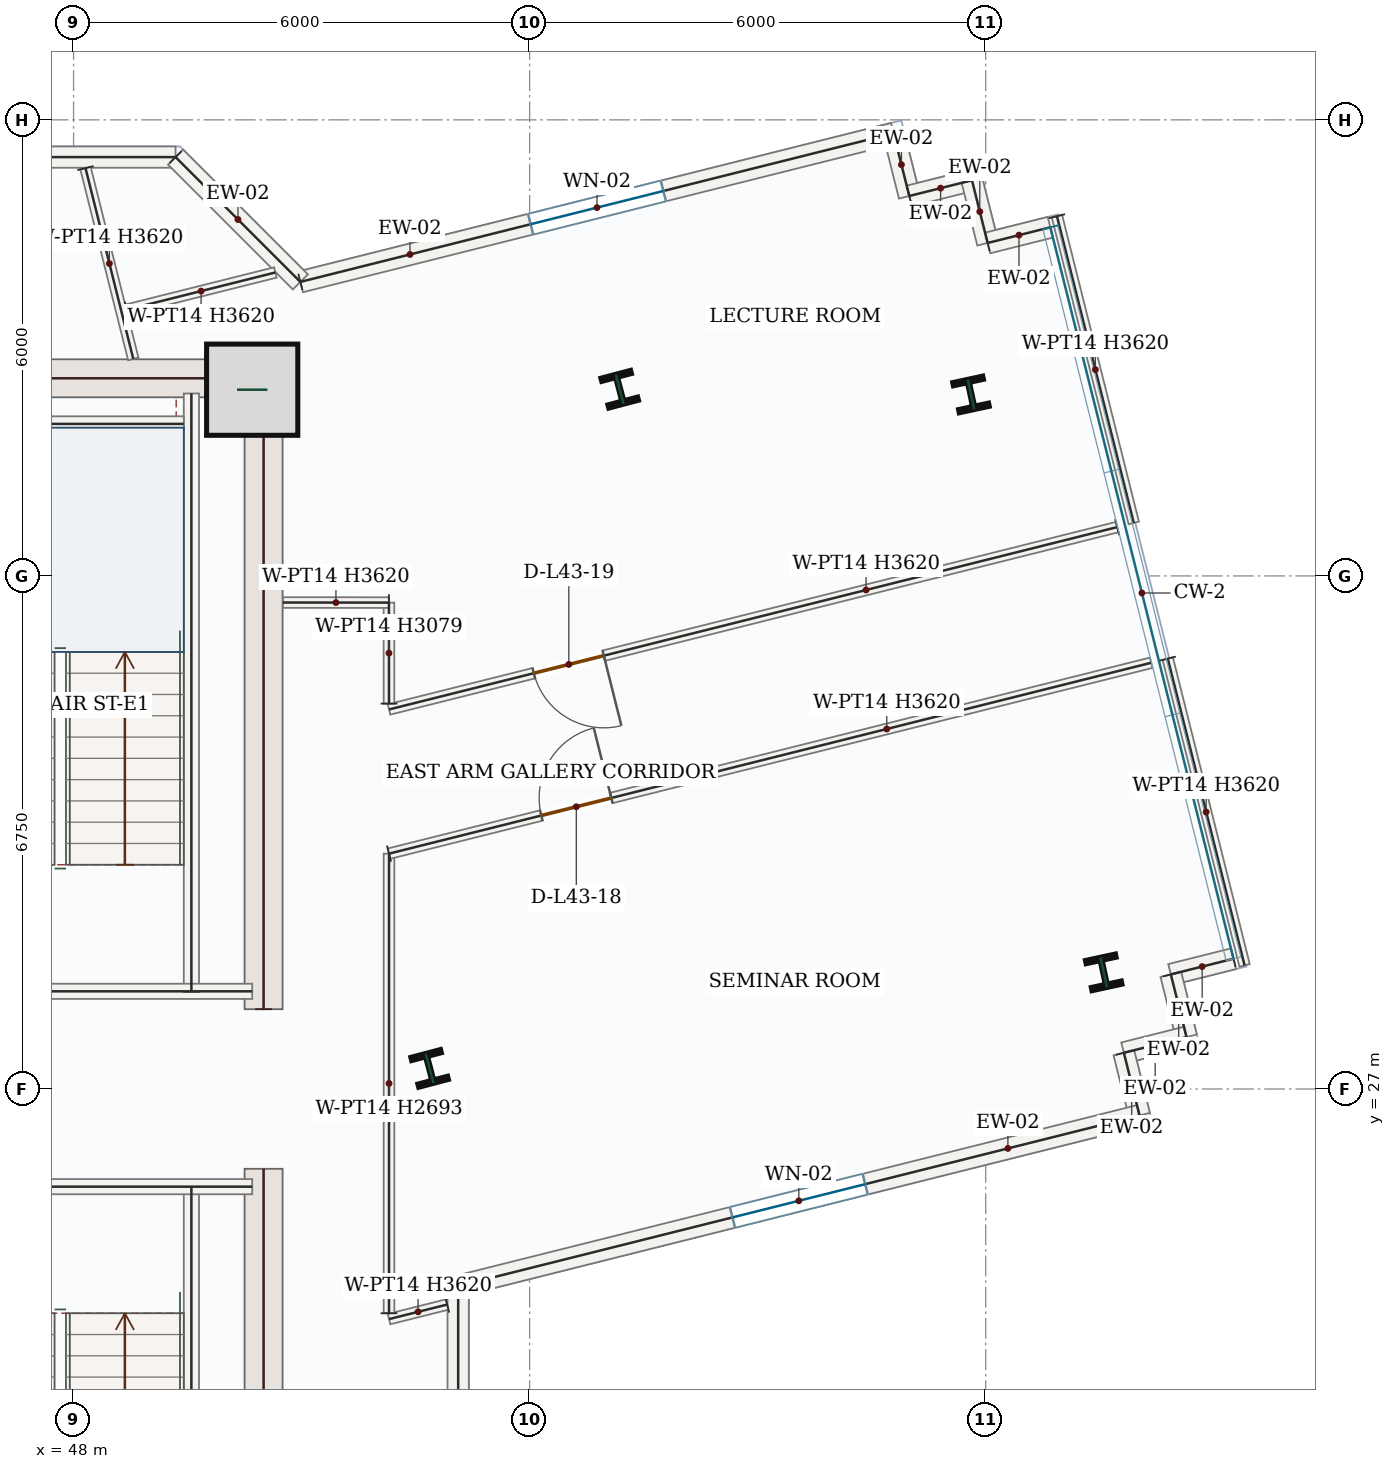
"""IFC4 building model, lengths in metres.
Left out: names, types, materials, properties, quantities, classifications, styles, units other than length and angle.
Written with IfcOpenShell. Run it as: python <this file> out.ifc"""

import sys

from ifc_helpers import new_model, si_unit, direction, frame, frame_2d, origin, origin_2d, place, context, subcontext, project, spatial, rectangle, i_section, extrude, source, transform, mapped, element, fill, save


model = new_model("IFC4")
c1 = context("Model", 3, precision=1e-05, world=origin(), true_north=direction((0.0, 1.0)))
c2 = subcontext(c1, "Body", "Model", "MODEL_VIEW")
j1 = project(units=[si_unit("LENGTHUNIT", "METRE"), si_unit("PLANEANGLEUNIT", "RADIAN")], contexts=[c1])
p1 = place(None, origin())
s1 = spatial("IfcSite", under=j1, at=p1, CompositionType="ELEMENT")
p2 = place(p1, origin())
s2 = spatial("IfcBuilding", under=s1, at=p2, CompositionType="ELEMENT")
p3 = place(p2, frame((0.0, 0.0, 186.3)))
s3 = spatial("IfcBuildingStorey", under=s2, at=p3, CompositionType="ELEMENT", Elevation=186.3)
m1 = source(origin(), c2, "Body", "SweptSolid", [
    extrude(rectangle(XDim=8.55, YDim=0.5, at=frame_2d((4.275, 0.0))), origin(), (0.0, 0.0, 1.0), 3.62),
])
for number, where, z_axis, x_axis in (
    (1, (50.5, 17.4, 0.0), (0.0, 0.0, 1.0), (0.0, 1.0, 0.0)),
    (2, (50.5, 28.05, 0.0), (0.0, 0.0, 1.0), (0.0, 1.0, 0.0)),
):
    element("IfcWall", number, at=place(p3, frame(where, z_axis=z_axis, x_axis=x_axis)), inside=s3, PredefinedType="SHEAR", context=c2, shape_type="MappedRepresentation", body=[
        mapped(m1, transform((0.0, 0.0, 0.0), x_axis=(1.0, 0.0, 0.0), y_axis=(0.0, 1.0, 0.0), z_axis=(0.0, 0.0, 1.0), scale=1.0)),
    ])
m2 = source(origin(), c2, "Body", "SweptSolid", [
    extrude(rectangle(XDim=7.0, YDim=0.5, at=frame_2d((3.5, 0.0))), origin(), (0.0, 0.0, 1.0), 3.62),
])
p4 = place(p3, frame((43.25, 36.35, 0.0), z_axis=(0.0, 0.0, 1.0), x_axis=(1.0, 0.0, 0.0)))
e3 = element("IfcWall", 3, at=p4, inside=s3, PredefinedType="SHEAR", context=c2, shape_type="MappedRepresentation", body=[
    mapped(m2, transform((0.0, 0.0, 0.0), x_axis=(1.0, 0.0, 0.0), y_axis=(0.0, 1.0, 0.0), z_axis=(0.0, 0.0, 1.0), scale=1.0)),
])
m3 = source(origin(), c2, "Body", "SweptSolid", [
    extrude(rectangle(XDim=1.2, YDim=1.2, at=origin_2d()), origin(), (0.0, 0.0, 1.0), 3.9),
])
p5 = place(p3, frame((50.35, 36.2, 0.0), z_axis=(0.0, 0.0, 1.0), x_axis=(1.0, 0.0, 0.0)))
e4 = element("IfcColumn", 4, at=p5, inside=s3, PredefinedType="COLUMN", context=c2, shape_type="MappedRepresentation", body=[
    mapped(m3, transform((0.0, 0.0, 0.0), x_axis=(1.0, 0.0, 0.0), y_axis=(0.0, 1.0, 0.0), z_axis=(0.0, 0.0, 1.0), scale=1.0)),
])
m4 = source(origin(), c2, "Body", "SweptSolid", [
    extrude(i_section(OverallWidth=0.404, OverallDepth=0.407, WebThickness=0.027, FlangeThickness=0.044, FilletRadius=0.018, at=origin_2d()), origin(), (0.0, 0.0, 1.0), 3.9),
])
for number, where, z_axis, x_axis in (
    (5, (52.684, 27.271, 0.0), (0.0, 0.0, 1.0), (0.967, 0.255, 0.0)),
    (6, (55.185, 36.206, 0.0), (0.0, 0.0, 1.0), (0.967, 0.255, 0.0)),
    (7, (61.553, 28.535, 0.0), (0.0, 0.0, 1.0), (0.977, 0.211, 0.0)),
    (8, (59.807, 36.137, 0.0), (0.0, 0.0, 1.0), (0.977, 0.211, 0.0)),
):
    element("IfcColumn", number, at=place(p3, frame(where, z_axis=z_axis, x_axis=x_axis)), inside=s3, PredefinedType="COLUMN", context=c2, shape_type="MappedRepresentation", body=[
        mapped(m4, transform((0.0, 0.0, 0.0), x_axis=(1.0, 0.0, 0.0), y_axis=(0.0, 1.0, 0.0), z_axis=(0.0, 0.0, 1.0), scale=1.0)),
    ])
p6 = place(p3, frame((50.984, 37.618, 0.0), z_axis=(0.0, 0.0, 1.0), x_axis=(0.970040669564, 0.242942584557, 0.0)))
e9 = element("IfcWall", 9, at=p6, inside=s3, PredefinedType="SOLIDWALL", context=c2, shape_type="SweptSolid", body=[
    extrude(rectangle(XDim=8.045, YDim=0.28, at=frame_2d((4.023, 0.0))), origin(), (0.0, 0.0, 1.0), 3.62),
])
p7 = place(p6, frame((3.123, 0.0, 0.85)))
e10 = element("IfcOpeningElement", 10, at=p7, cuts=e9, PredefinedType="OPENING", context=c2, shape_type="SweptSolid", body=[
    extrude(rectangle(XDim=1.8, YDim=1.75, at=frame_2d((0.9, 0.875))), frame((0.0, 0.15, 0.0), z_axis=(0.0, -1.0, 0.0), x_axis=(1.0, 0.0, 0.0)), (0.0, 0.0, 1.0), 0.3),
])
m5 = source(origin(), c2, "Body", "SweptSolid", [
    extrude(rectangle(XDim=0.85, YDim=0.28, at=frame_2d((0.425, 0.0))), origin(), (0.0, 0.0, 1.0), 3.62),
])
for number, where, z_axis, x_axis in (
    (11, (58.788, 39.573, 0.0), (0.0, 0.0, 1.0), (0.243, -0.97, 0.0)),
    (12, (58.995, 38.748, 0.0), (0.0, 0.0, 1.0), (0.97, 0.243, 0.0)),
):
    element("IfcWall", number, at=place(p3, frame(where, z_axis=z_axis, x_axis=x_axis)), inside=s3, PredefinedType="SOLIDWALL", context=c2, shape_type="MappedRepresentation", body=[
        mapped(m5, transform((0.0, 0.0, 0.0), x_axis=(1.0, 0.0, 0.0), y_axis=(0.0, 1.0, 0.0), z_axis=(0.0, 0.0, 1.0), scale=1.0)),
    ])
m6 = source(origin(), c2, "Body", "SweptSolid", [
    extrude(rectangle(XDim=0.85, YDim=0.28, at=frame_2d((0.425, 0.0))), origin(), (0.0, 0.0, 1.0), 3.62),
])
p8 = place(p3, frame((59.819, 38.955, 0.0), z_axis=(0.0, 0.0, 1.0), x_axis=(0.242941012307, -0.970041063326, 0.0)))
e13 = element("IfcWall", 13, at=p8, inside=s3, PredefinedType="SOLIDWALL", context=c2, shape_type="MappedRepresentation", body=[
    mapped(m6, transform((0.0, 0.0, 0.0), x_axis=(1.0, 0.0, 0.0), y_axis=(0.0, 1.0, 0.0), z_axis=(0.0, 0.0, 1.0), scale=1.0)),
])
for number, where, z_axis, x_axis in (
    (14, (60.026, 38.13, 0.0), (0.0, 0.0, 1.0), (0.97, 0.243, 0.0)),
    (15, (63.26, 28.714, 0.0), (0.0, 0.0, 1.0), (-0.97, -0.243, 0.0)),
    (16, (62.436, 28.507, 0.0), (0.0, 0.0, 1.0), (0.243, -0.97, 0.0)),
):
    element("IfcWall", number, at=place(p3, frame(where, z_axis=z_axis, x_axis=x_axis)), inside=s3, PredefinedType="SOLIDWALL", context=c2, shape_type="MappedRepresentation", body=[
        mapped(m5, transform((0.0, 0.0, 0.0), x_axis=(1.0, 0.0, 0.0), y_axis=(0.0, 1.0, 0.0), z_axis=(0.0, 0.0, 1.0), scale=1.0)),
    ])
p9 = place(p3, frame((62.642, 27.683, 0.0), z_axis=(0.0, 0.0, 1.0), x_axis=(-0.970041063326, -0.242941012307, 0.0)))
e17 = element("IfcWall", 17, at=p9, inside=s3, PredefinedType="SOLIDWALL", context=c2, shape_type="MappedRepresentation", body=[
    mapped(m6, transform((0.0, 0.0, 0.0), x_axis=(1.0, 0.0, 0.0), y_axis=(0.0, 1.0, 0.0), z_axis=(0.0, 0.0, 1.0), scale=1.0)),
])
p10 = place(p3, frame((61.818, 27.476, 0.0), z_axis=(0.0, 0.0, 1.0), x_axis=(0.243008704507, -0.970024107708, 0.0)))
e18 = element("IfcWall", 18, at=p10, inside=s3, PredefinedType="SOLIDWALL", context=c2, shape_type="MappedRepresentation", body=[
    mapped(m5, transform((0.0, 0.0, 0.0), x_axis=(1.0, 0.0, 0.0), y_axis=(0.0, 1.0, 0.0), z_axis=(0.0, 0.0, 1.0), scale=1.0)),
])
p11 = place(p3, frame((62.024, 26.652, 0.0), z_axis=(0.0, 0.0, 1.0), x_axis=(-0.970044513566, -0.242927235402, 0.0)))
e19 = element("IfcWall", 19, at=p11, inside=s3, PredefinedType="SOLIDWALL", context=c2, shape_type="SweptSolid", body=[
    extrude(rectangle(XDim=9.241, YDim=0.28, at=frame_2d((4.621, 0.0))), origin(), (0.0, 0.0, 1.0), 3.62),
])
p12 = place(p11, frame((3.721, 0.0, 0.85)))
e20 = element("IfcOpeningElement", 20, at=p12, cuts=e19, PredefinedType="OPENING", context=c2, shape_type="SweptSolid", body=[
    extrude(rectangle(XDim=1.8, YDim=1.75, at=frame_2d((0.9, 0.875))), frame((0.0, 0.15, 0.0), z_axis=(0.0, -1.0, 0.0), x_axis=(1.0, 0.0, 0.0)), (0.0, 0.0, 1.0), 0.3),
])
m7 = source(origin(), c2, "Body", "SweptSolid", [
    extrude(rectangle(XDim=5.949, YDim=0.28, at=frame_2d((2.975, 0.0))), origin(), (0.0, 0.0, 1.0), 3.62),
])
p13 = place(p3, frame((53.06, 24.407, 0.0), z_axis=(0.0, 0.0, 1.0), x_axis=(0.0, -1.0, 0.0)))
e21 = element("IfcWall", 21, at=p13, inside=s3, PredefinedType="SOLIDWALL", context=c2, shape_type="MappedRepresentation", body=[
    mapped(m7, transform((0.0, 0.0, 0.0), x_axis=(1.0, 0.0, 0.0), y_axis=(0.0, 1.0, 0.0), z_axis=(0.0, 0.0, 1.0), scale=1.0)),
])
m8 = source(origin(), c2, "Body", "SweptSolid", [
    extrude(rectangle(XDim=9.547, YDim=0.28, at=frame_2d((4.773, 0.0))), origin(), (0.0, 0.0, 1.0), 3.62),
])
p14 = place(p3, frame((39.795, 39.26, 0.0), z_axis=(0.0, 0.0, 1.0), x_axis=(1.0, 0.0, 0.0)))
e22 = element("IfcWall", 22, at=p14, inside=s3, PredefinedType="SOLIDWALL", context=c2, shape_type="MappedRepresentation", body=[
    mapped(m8, transform((0.0, 0.0, 0.0), x_axis=(1.0, 0.0, 0.0), y_axis=(0.0, 1.0, 0.0), z_axis=(0.0, 0.0, 1.0), scale=1.0)),
])
m9 = source(origin(), c2, "Body", "SweptSolid", [
    extrude(rectangle(XDim=2.322, YDim=0.28, at=frame_2d((1.161, 0.0))), origin(), (0.0, 0.0, 1.0), 3.62),
])
p15 = place(p3, frame((49.342, 39.26, 0.0), z_axis=(0.0, 0.0, 1.0), x_axis=(0.707106781187, -0.707106781187, 0.0)))
e23 = element("IfcWall", 23, at=p15, inside=s3, PredefinedType="SOLIDWALL", context=c2, shape_type="MappedRepresentation", body=[
    mapped(m9, transform((0.0, 0.0, 0.0), x_axis=(1.0, 0.0, 0.0), y_axis=(0.0, 1.0, 0.0), z_axis=(0.0, 0.0, 1.0), scale=1.0)),
])
m10 = source(origin(), c2, "Body", "SweptSolid", [
    extrude(rectangle(XDim=7.87, YDim=0.2, at=frame_2d((3.935, 0.0))), origin(), (0.0, 0.0, 1.0), 3.62),
])
for number, where, z_axis, x_axis in (
    (24, (49.55, 17.85, 0.0), (0.0, 0.0, 1.0), (0.0, 1.0, 0.0)),
    (25, (49.55, 28.28, 0.0), (0.0, 0.0, 1.0), (0.0, 1.0, 0.0)),
):
    element("IfcWall", number, at=place(p3, frame(where, z_axis=z_axis, x_axis=x_axis)), inside=s3, PredefinedType="SOLIDWALL", context=c2, shape_type="MappedRepresentation", body=[
        mapped(m10, transform((0.0, 0.0, 0.0), x_axis=(1.0, 0.0, 0.0), y_axis=(0.0, 1.0, 0.0), z_axis=(0.0, 0.0, 1.0), scale=1.0)),
    ])
m11 = source(origin(), c2, "Body", "SweptSolid", [
    extrude(rectangle(XDim=4.25, YDim=0.2, at=frame_2d((2.125, 0.0))), origin(), (0.0, 0.0, 1.0), 3.62),
])
for number, where, z_axis, x_axis in (
    (26, (46.1, 25.715, 0.0), (0.0, 0.0, 1.0), (1.0, 0.0, 0.0)),
    (27, (46.1, 28.285, 0.0), (0.0, 0.0, 1.0), (1.0, 0.0, 0.0)),
):
    element("IfcWall", number, at=place(p3, frame(where, z_axis=z_axis, x_axis=x_axis)), inside=s3, PredefinedType="SOLIDWALL", context=c2, shape_type="MappedRepresentation", body=[
        mapped(m11, transform((0.0, 0.0, 0.0), x_axis=(1.0, 0.0, 0.0), y_axis=(0.0, 1.0, 0.0), z_axis=(0.0, 0.0, 1.0), scale=1.0)),
    ])
m12 = source(origin(), c2, "Body", "SweptSolid", [
    extrude(rectangle(XDim=3.25, YDim=0.2, at=frame_2d((1.625, 0.0))), origin(), (0.0, 0.0, 1.0), 3.62),
])
p16 = place(p3, frame((46.2, 35.75, 0.0), z_axis=(0.0, 0.0, 1.0), x_axis=(1.0, 0.0, 0.0)))
e28 = element("IfcWall", 28, at=p16, inside=s3, PredefinedType="SOLIDWALL", context=c2, shape_type="MappedRepresentation", body=[
    mapped(m12, transform((0.0, 0.0, 0.0), x_axis=(1.0, 0.0, 0.0), y_axis=(0.0, 1.0, 0.0), z_axis=(0.0, 0.0, 1.0), scale=1.0)),
])
m13 = source(origin(), c2, "Body", "SweptSolid", [
    extrude(rectangle(XDim=2.588, YDim=0.14, at=frame_2d((1.294, 0.0))), origin(), (0.0, 0.0, 1.0), 3.62),
])
p17 = place(p3, frame((48.157, 39.115, 0.0), z_axis=(0.0, 0.0, 1.0), x_axis=(0.242957412811, -0.97003695577, 0.0)))
e29 = element("IfcWall", 29, at=p17, inside=s3, PredefinedType="PARTITIONING", context=c2, shape_type="MappedRepresentation", body=[
    mapped(m13, transform((0.0, 0.0, 0.0), x_axis=(1.0, 0.0, 0.0), y_axis=(0.0, 1.0, 0.0), z_axis=(0.0, 0.0, 1.0), scale=1.0)),
])
m14 = source(origin(), c2, "Body", "SweptSolid", [
    extrude(rectangle(XDim=2.014, YDim=0.14, at=frame_2d((1.007, 0.0))), origin(), (0.0, 0.0, 1.0), 3.62),
])
p18 = place(p3, frame((48.701, 37.253, 0.0), z_axis=(0.0, 0.0, 1.0), x_axis=(0.970056889313, 0.242877811867, 0.0)))
e30 = element("IfcWall", 30, at=p18, inside=s3, PredefinedType="PARTITIONING", context=c2, shape_type="MappedRepresentation", body=[
    mapped(m14, transform((0.0, 0.0, 0.0), x_axis=(1.0, 0.0, 0.0), y_axis=(0.0, 1.0, 0.0), z_axis=(0.0, 0.0, 1.0), scale=1.0)),
])
m15 = source(origin(), c2, "Body", "SweptSolid", [
    extrude(rectangle(XDim=4.16, YDim=0.14, at=frame_2d((2.08, 0.0))), origin(), (0.0, 0.0, 1.0), 3.62),
])
p19 = place(p3, frame((60.938, 38.482, 0.0), z_axis=(0.0, 0.0, 1.0), x_axis=(0.242963670411, -0.970035388458, 0.0)))
e31 = element("IfcWall", 31, at=p19, inside=s3, PredefinedType="PARTITIONING", context=c2, shape_type="MappedRepresentation", body=[
    mapped(m15, transform((0.0, 0.0, 0.0), x_axis=(1.0, 0.0, 0.0), y_axis=(0.0, 1.0, 0.0), z_axis=(0.0, 0.0, 1.0), scale=1.0)),
])
p20 = place(p3, frame((61.73, 34.392, 0.0), z_axis=(0.0, 0.0, 1.0), x_axis=(-0.970043536382, -0.242931137411, 0.0)))
e32 = element("IfcWall", 32, at=p20, inside=s3, PredefinedType="PARTITIONING", context=c2, shape_type="SweptSolid", body=[
    extrude(rectangle(XDim=9.876, YDim=0.14, at=frame_2d((4.938, 0.0))), origin(), (0.0, 0.0, 1.0), 3.62),
])
p21 = place(p20, frame((6.962, 0.0, 0.0)))
e33 = element("IfcOpeningElement", 33, at=p21, cuts=e32, PredefinedType="OPENING", context=c2, shape_type="SweptSolid", body=[
    extrude(rectangle(XDim=0.95, YDim=2.15, at=frame_2d((0.475, 1.075))), frame((0.0, 0.08, 0.0), z_axis=(0.0, -1.0, 0.0), x_axis=(1.0, 0.0, 0.0)), (0.0, 0.0, 1.0), 0.16),
])
m16 = source(origin(), c2, "Body", "SweptSolid", [
    extrude(rectangle(XDim=1.329, YDim=0.14, at=frame_2d((0.664, 0.0))), origin(), (0.0, 0.0, 1.0), 3.079),
])
p22 = place(p3, frame((52.15, 32.07, 0.0), z_axis=(0.0, 0.0, 1.0), x_axis=(-0.00073502369, 0.99999972987, 0.0)))
e34 = element("IfcWall", 34, at=p22, inside=s3, PredefinedType="PARTITIONING", context=c2, shape_type="MappedRepresentation", body=[
    mapped(m16, transform((0.0, 0.0, 0.0), x_axis=(1.0, 0.0, 0.0), y_axis=(0.0, 1.0, 0.0), z_axis=(0.0, 0.0, 1.0), scale=1.0)),
])
m17 = source(origin(), c2, "Body", "SweptSolid", [
    extrude(rectangle(XDim=1.394, YDim=0.14, at=frame_2d((0.697, 0.0))), origin(), (0.0, 0.0, 1.0), 3.62),
])
p23 = place(p3, frame((52.149, 33.399, 0.0), z_axis=(0.0, 0.0, 1.0), x_axis=(-0.999999754632, 0.000700525222, 0.0)))
e35 = element("IfcWall", 35, at=p23, inside=s3, PredefinedType="PARTITIONING", context=c2, shape_type="MappedRepresentation", body=[
    mapped(m17, transform((0.0, 0.0, 0.0), x_axis=(1.0, 0.0, 0.0), y_axis=(0.0, 1.0, 0.0), z_axis=(0.0, 0.0, 1.0), scale=1.0)),
])
p24 = place(p3, frame((62.395, 32.662, 0.0), z_axis=(0.0, 0.0, 1.0), x_axis=(0.242963670411, -0.970035388458, 0.0)))
e36 = element("IfcWall", 36, at=p24, inside=s3, PredefinedType="PARTITIONING", context=c2, shape_type="MappedRepresentation", body=[
    mapped(m15, transform((0.0, 0.0, 0.0), x_axis=(1.0, 0.0, 0.0), y_axis=(0.0, 1.0, 0.0), z_axis=(0.0, 0.0, 1.0), scale=1.0)),
])
m18 = source(origin(), c2, "Body", "SweptSolid", [
    extrude(rectangle(XDim=0.789, YDim=0.14, at=frame_2d((0.395, 0.0))), origin(), (0.0, 0.0, 1.0), 3.62),
])
p25 = place(p3, frame((52.915, 24.164, 0.0), z_axis=(0.0, 0.0, 1.0), x_axis=(-0.970033159667, -0.242972568711, 0.0)))
e37 = element("IfcWall", 37, at=p25, inside=s3, PredefinedType="PARTITIONING", context=c2, shape_type="MappedRepresentation", body=[
    mapped(m18, transform((0.0, 0.0, 0.0), x_axis=(1.0, 0.0, 0.0), y_axis=(0.0, 1.0, 0.0), z_axis=(0.0, 0.0, 1.0), scale=1.0)),
])
m19 = source(origin(), c2, "Body", "SweptSolid", [
    extrude(rectangle(XDim=6.046, YDim=0.14, at=frame_2d((3.023, 0.0))), origin(), (0.0, 0.0, 1.0), 2.693),
])
p26 = place(p3, frame((52.15, 24.05, 0.0), z_axis=(0.0, 0.0, 1.0), x_axis=(0.0, 1.0, 0.0)))
e38 = element("IfcWall", 38, at=p26, inside=s3, PredefinedType="PARTITIONING", context=c2, shape_type="MappedRepresentation", body=[
    mapped(m19, transform((0.0, 0.0, 0.0), x_axis=(1.0, 0.0, 0.0), y_axis=(0.0, 1.0, 0.0), z_axis=(0.0, 0.0, 1.0), scale=1.0)),
])
p27 = place(p3, frame((52.15, 30.096, 0.0), z_axis=(0.0, 0.0, 1.0), x_axis=(0.970040994122, 0.242941288635, 0.0)))
e39 = element("IfcWall", 39, at=p27, inside=s3, PredefinedType="PARTITIONING", context=c2, shape_type="SweptSolid", body=[
    extrude(rectangle(XDim=10.337, YDim=0.14, at=frame_2d((5.168, 0.0))), origin(), (0.0, 0.0, 1.0), 3.62),
])
p28 = place(p27, frame((2.065, 0.0, 0.0)))
e40 = element("IfcOpeningElement", 40, at=p28, cuts=e39, PredefinedType="OPENING", context=c2, shape_type="SweptSolid", body=[
    extrude(rectangle(XDim=0.95, YDim=2.15, at=frame_2d((0.475, 1.075))), frame((0.0, 0.08, 0.0), z_axis=(0.0, -1.0, 0.0), x_axis=(1.0, 0.0, 0.0)), (0.0, 0.0, 1.0), 0.16),
])
m20 = source(origin(), c2, "Body", "SweptSolid", [
    extrude(rectangle(XDim=1.8, YDim=1.75, at=frame_2d((0.9, 0.875))), frame((0.0, 0.03, 0.0), z_axis=(0.0, -1.0, 0.0), x_axis=(1.0, 0.0, 0.0)), (0.0, 0.0, 1.0), 0.06),
])
p29 = place(p7, origin())
e41 = element("IfcWindow", 41, at=p29, inside=s3, PartitioningType="DOUBLE_PANEL_VERTICAL", PredefinedType="WINDOW", context=c2, shape_type="MappedRepresentation", body=[
    mapped(m20, transform((0.0, 0.0, 0.0), x_axis=(1.0, 0.0, 0.0), y_axis=(0.0, 1.0, 0.0), z_axis=(0.0, 0.0, 1.0), scale=1.0)),
])
fill(e10, e41)
p30 = place(p12, origin())
e42 = element("IfcWindow", 42, at=p30, inside=s3, PartitioningType="DOUBLE_PANEL_VERTICAL", PredefinedType="WINDOW", context=c2, shape_type="MappedRepresentation", body=[
    mapped(m20, transform((0.0, 0.0, 0.0), x_axis=(1.0, 0.0, 0.0), y_axis=(0.0, 1.0, 0.0), z_axis=(0.0, 0.0, 1.0), scale=1.0)),
])
fill(e20, e42)
m21 = source(origin(), c2, "Body", "SweptSolid", [
    extrude(rectangle(XDim=0.95, YDim=2.15, at=frame_2d((0.475, 1.075))), frame((0.0, 0.025, 0.0), z_axis=(0.0, -1.0, 0.0), x_axis=(1.0, 0.0, 0.0)), (0.0, 0.0, 1.0), 0.05),
])
p31 = place(p28, origin())
e43 = element("IfcDoor", 43, at=p31, inside=s3, OperationType="SINGLE_SWING_RIGHT", PredefinedType="DOOR", context=c2, shape_type="MappedRepresentation", body=[
    mapped(m21, transform((0.0, 0.0, 0.0), x_axis=(1.0, 0.0, 0.0), y_axis=(0.0, 1.0, 0.0), z_axis=(0.0, 0.0, 1.0), scale=1.0)),
])
fill(e40, e43)
p32 = place(p21, origin())
e44 = element("IfcDoor", 44, at=p32, inside=s3, OperationType="SINGLE_SWING_LEFT", PredefinedType="DOOR", context=c2, shape_type="MappedRepresentation", body=[
    mapped(m21, transform((0.0, 0.0, 0.0), x_axis=(1.0, 0.0, 0.0), y_axis=(0.0, 1.0, 0.0), z_axis=(0.0, 0.0, 1.0), scale=1.0)),
])
fill(e33, e44)
save(model, sys.argv[1])
